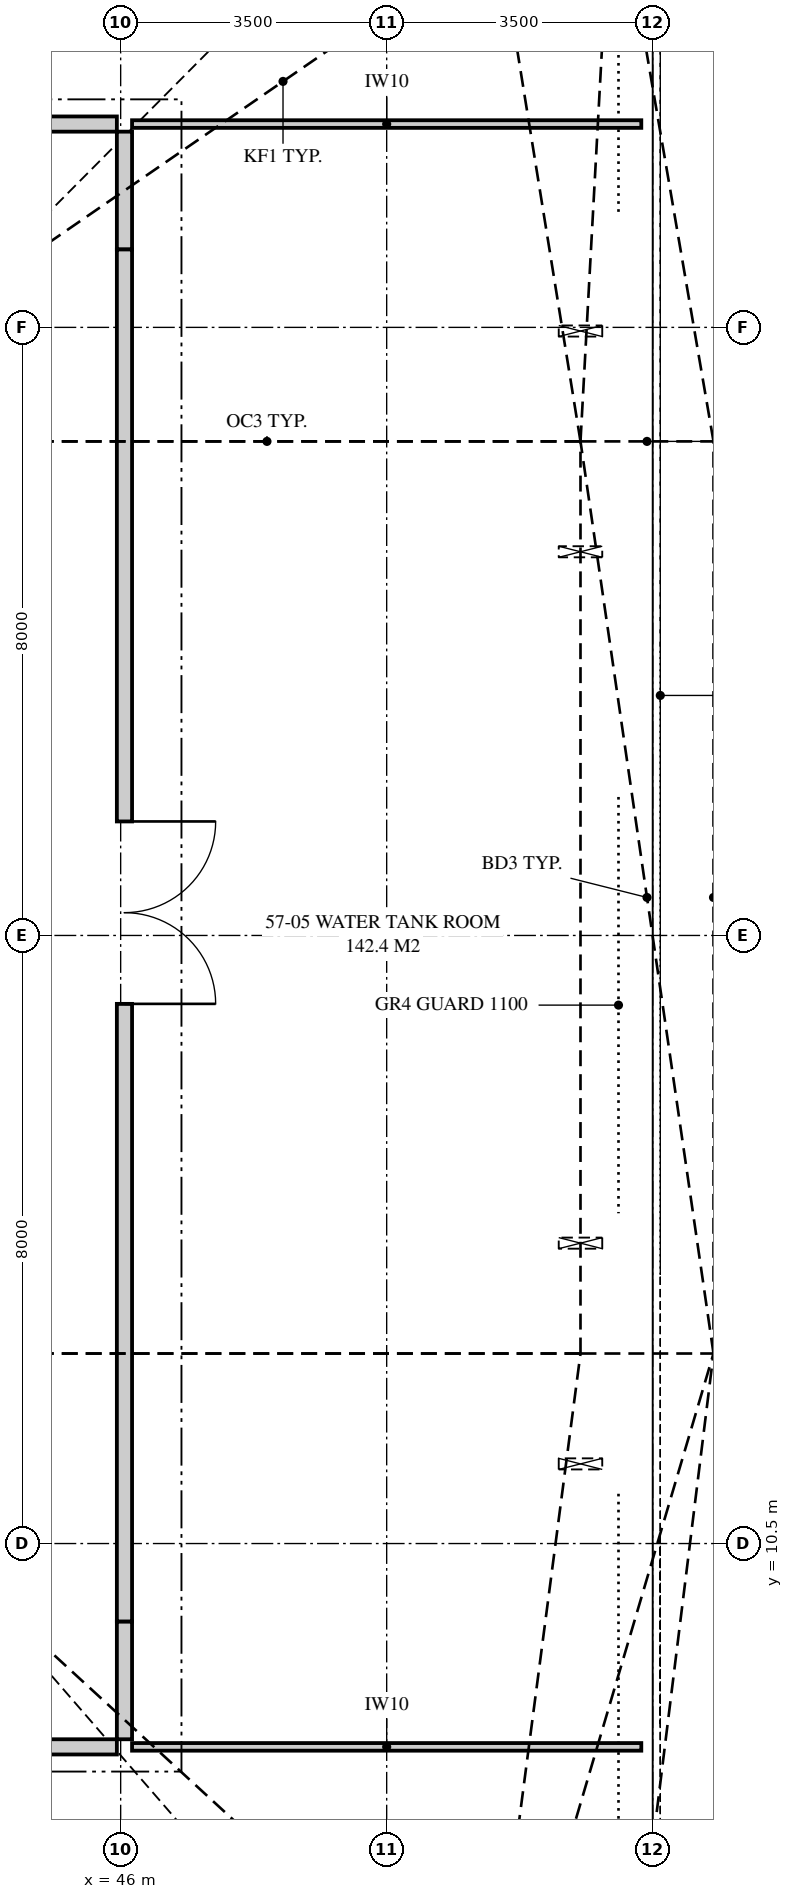
"""IFC4 building model, lengths in metres.
Left out: names, types, materials, properties, quantities, classifications, styles, units other than length and angle.
Written with IfcOpenShell. Run it as: python <this file> out.ifc"""

import sys

from ifc_helpers import new_model, si_unit, direction, frame, frame_2d, origin, place, context, subcontext, project, spatial, polyline, rectangle, outline, extrude, element, fill, save


model = new_model("IFC4")
c1 = context("Model", 3, precision=1e-05, world=origin(), true_north=direction((0.0, 1.0)))
c2 = subcontext(c1, "Body", "Model", "MODEL_VIEW")
j1 = project(units=[si_unit("LENGTHUNIT", "METRE"), si_unit("PLANEANGLEUNIT", "RADIAN")], contexts=[c1])
p1 = place(None, origin())
s1 = spatial("IfcSite", under=j1, at=p1, CompositionType="ELEMENT")
p2 = place(p1, origin())
s2 = spatial("IfcBuilding", under=s1, at=p2, CompositionType="ELEMENT")
p3 = place(p2, frame((0.0, 0.0, 207.95)))
s3 = spatial("IfcBuildingStorey", under=s2, at=p3, CompositionType="ELEMENT", Elevation=207.95)
p4 = place(p3, frame((17.85, 7.825, 0.0), z_axis=(0.0, 0.0, 1.0), x_axis=(1.0, 0.0, 0.0)))
e1 = element("IfcWall", 1, at=p4, inside=s3, PredefinedType="PARTITIONING", context=c2, shape_type="SweptSolid", body=[
    extrude(outline(polyline([(28.1, 1.2), (28.1, 4.72), (24.046, 4.72), (24.046, 4.141), (23.199, 4.141), (23.199, 4.72), (20.797, 4.72), (20.797, 4.141), (19.951, 4.141), (19.951, 4.72), (17.281, 4.72), (17.281, 4.245), (16.769, 4.245), (16.769, 4.72), (15.675, 4.72), (15.675, 4.141), (14.708, 4.141), (14.708, 4.72), (10.886, 4.72), (10.886, 4.141), (10.042, 4.141), (10.042, 4.72), (5.956, 4.72), (5.956, 4.141), (5.037, 4.141), (5.037, 4.72), (3.758, 4.72), (3.758, 4.141), (3.117, 4.141), (3.117, 4.72), (1.606, 4.72), (1.606, 4.141), (1.038, 4.141), (1.038, 4.72), (0.0, 4.72), (0.0, 1.2), (1.102, 1.2), (1.102, 0.0), (27.304, 0.0), (27.304, 1.2), (28.1, 1.2)]), holes=[polyline([(16.179, 3.43), (16.686, 3.496), (16.686, 3.004), (16.632, 2.889), (16.125, 2.824), (16.125, 3.316), (16.179, 3.43)])]), frame((0.0, 0.1, 0.0), z_axis=(0.0, -1.0, 0.0), x_axis=(1.0, 0.0, 0.0)), (0.0, 0.0, 1.0), 0.2),
])
p5 = place(p4, frame((1.325, 0.0, 0.0)))
e2 = element("IfcOpeningElement", 2, at=p5, cuts=e1, PredefinedType="OPENING", context=c2, shape_type="SweptSolid", body=[
    extrude(rectangle(XDim=1.0, YDim=2.1, at=frame_2d((0.5, 1.05))), frame((0.0, 0.11, 0.0), z_axis=(0.0, -1.0, 0.0), x_axis=(1.0, 0.0, 0.0)), (0.0, 0.0, 1.0), 0.22),
])
p6 = place(p4, frame((26.1, 0.0, 0.0)))
e3 = element("IfcOpeningElement", 3, at=p6, cuts=e1, PredefinedType="OPENING", context=c2, shape_type="SweptSolid", body=[
    extrude(rectangle(XDim=1.0, YDim=2.1, at=frame_2d((0.5, 1.05))), frame((0.0, 0.11, 0.0), z_axis=(0.0, -1.0, 0.0), x_axis=(1.0, 0.0, 0.0)), (0.0, 0.0, 1.0), 0.22),
])
p7 = place(p3, frame((46.05, 7.925, 0.0), z_axis=(0.0, 0.0, 1.0), x_axis=(0.0, 1.0, 0.0)))
e4 = element("IfcWall", 4, at=p7, inside=s3, PredefinedType="PARTITIONING", context=c2, shape_type="SweptSolid", body=[
    extrude(outline(polyline([(1.55, 0.0), (1.55, 4.72), (0.669, 4.72), (0.669, 4.141), (0.0, 4.141), (0.0, 1.2), (0.609, 1.2), (0.609, 0.0), (1.55, 0.0)])), frame((0.0, 0.1, 0.0), z_axis=(0.0, -1.0, 0.0), x_axis=(1.0, 0.0, 0.0)), (0.0, 0.0, 1.0), 0.2),
])
p8 = place(p3, frame((17.85, 29.175, 0.0), z_axis=(0.0, 0.0, 1.0), x_axis=(1.0, 0.0, 0.0)))
e5 = element("IfcWall", 5, at=p8, inside=s3, PredefinedType="PARTITIONING", context=c2, shape_type="SweptSolid", body=[
    extrude(outline(polyline([(28.1, 1.2), (28.1, 4.72), (23.48, 4.72), (23.48, 4.141), (22.49, 4.141), (22.49, 4.72), (21.506, 4.72), (21.506, 4.141), (20.516, 4.141), (20.516, 4.72), (17.281, 4.72), (17.281, 4.245), (16.769, 4.245), (16.769, 4.72), (13.232, 4.72), (13.232, 4.141), (12.437, 4.141), (12.437, 4.72), (11.948, 4.72), (11.948, 4.141), (11.126, 4.141), (11.126, 4.72), (4.143, 4.72), (4.143, 4.141), (2.733, 4.141), (2.733, 4.72), (1.35, 4.72), (1.35, 4.141), (0.74, 4.141), (0.74, 4.72), (0.0, 4.72), (0.0, 1.2), (0.892, 1.2), (0.892, 0.0), (27.554, 0.0), (27.554, 1.2), (28.1, 1.2)]), holes=[polyline([(16.106, 3.278), (16.617, 3.359), (16.617, 2.855), (16.556, 2.728), (16.045, 2.646), (16.045, 3.15), (16.106, 3.278)])]), frame((0.0, 0.1, 0.0), z_axis=(0.0, -1.0, 0.0), x_axis=(1.0, 0.0, 0.0)), (0.0, 0.0, 1.0), 0.2),
])
p9 = place(p8, frame((12.8, 0.0, 0.0)))
e6 = element("IfcOpeningElement", 6, at=p9, cuts=e5, PredefinedType="OPENING", context=c2, shape_type="SweptSolid", body=[
    extrude(rectangle(XDim=2.4, YDim=2.4, at=frame_2d((1.2, 1.2))), frame((0.0, 0.11, 0.0), z_axis=(0.0, -1.0, 0.0), x_axis=(1.0, 0.0, 0.0)), (0.0, 0.0, 1.0), 0.22),
])
p10 = place(p3, frame((46.05, 27.525, 0.0), z_axis=(0.0, 0.0, 1.0), x_axis=(0.0, 1.0, 0.0)))
e7 = element("IfcWall", 7, at=p10, inside=s3, PredefinedType="PARTITIONING", context=c2, shape_type="SweptSolid", body=[
    extrude(outline(polyline([(1.55, 1.2), (1.55, 4.72), (1.13, 4.72), (1.13, 4.141), (0.419, 4.141), (0.419, 4.72), (0.0, 4.72), (0.0, 0.0), (0.681, 0.0), (0.681, 1.2), (1.55, 1.2)])), frame((0.0, 0.1, 0.0), z_axis=(0.0, -1.0, 0.0), x_axis=(1.0, 0.0, 0.0)), (0.0, 0.0, 1.0), 0.2),
])
p11 = place(p3, frame((46.05, 9.475, 0.0), z_axis=(0.0, 0.0, 1.0), x_axis=(0.0, 1.0, 0.0)))
e8 = element("IfcWall", 8, at=p11, inside=s3, PredefinedType="PARTITIONING", context=c2, shape_type="SweptSolid", body=[
    extrude(outline(polyline([(18.05, 0.0), (18.05, 4.72), (15.737, 4.72), (15.737, 4.245), (15.313, 4.245), (15.313, 4.72), (3.737, 4.72), (3.737, 4.245), (3.313, 4.245), (3.313, 4.72), (0.0, 4.72), (0.0, 0.0), (18.05, 0.0)]), holes=[polyline([(3.303, 2.771), (3.303, 3.467), (3.747, 3.467), (3.747, 2.771), (3.303, 2.771)]), polyline([(15.303, 2.771), (15.303, 3.467), (15.747, 3.467), (15.747, 2.771), (15.303, 2.771)])]), frame((0.0, 0.1, 0.0), z_axis=(0.0, -1.0, 0.0), x_axis=(1.0, 0.0, 0.0)), (0.0, 0.0, 1.0), 0.2),
])
p12 = place(p11, frame((8.125, 0.0, 0.0)))
e9 = element("IfcOpeningElement", 9, at=p12, cuts=e8, PredefinedType="OPENING", context=c2, shape_type="SweptSolid", body=[
    extrude(rectangle(XDim=2.4, YDim=2.4, at=frame_2d((1.2, 1.2))), frame((0.0, 0.11, 0.0), z_axis=(0.0, -1.0, 0.0), x_axis=(1.0, 0.0, 0.0)), (0.0, 0.0, 1.0), 0.22),
])
p13 = place(p3, frame((46.15, 7.825, 0.0), z_axis=(0.0, 0.0, 1.0), x_axis=(1.0, 0.0, 0.0)))
e10 = element("IfcWall", 10, at=p13, inside=s3, PredefinedType="PARTITIONING", context=c2, shape_type="SweptSolid", body=[
    extrude(outline(polyline([(0.458, 0.0), (6.7, 0.0), (6.7, 1.203), (5.626, 1.203), (5.626, 2.204), (5.66, 2.257), (6.614, 2.379), (6.7, 2.379), (6.7, 3.72), (6.499, 3.72), (6.499, 4.72), (0.691, 4.72), (0.691, 4.141), (0.0, 4.141), (0.0, 1.2), (0.458, 1.2), (0.458, 0.0)])), frame((0.0, 0.05, 0.0), z_axis=(0.0, -1.0, 0.0), x_axis=(1.0, 0.0, 0.0)), (0.0, 0.0, 1.0), 0.1),
])
p14 = place(p3, frame((46.15, 29.175, 0.0), z_axis=(0.0, 0.0, 1.0), x_axis=(1.0, 0.0, 0.0)))
e11 = element("IfcWall", 11, at=p14, inside=s3, PredefinedType="PARTITIONING", context=c2, shape_type="SweptSolid", body=[
    extrude(outline(polyline([(0.812, 0.0), (6.7, 0.0), (6.7, 3.72), (6.416, 3.72), (6.416, 4.72), (1.66, 4.72), (1.66, 4.141), (0.682, 4.141), (0.682, 4.72), (0.0, 4.72), (0.0, 1.2), (0.812, 1.2), (0.812, 0.0)]), holes=[polyline([(5.665, 1.329), (5.665, 2.411), (5.671, 2.485), (6.592, 2.518), (6.592, 1.435), (6.585, 1.361), (5.665, 1.329)])]), frame((0.0, 0.05, 0.0), z_axis=(0.0, -1.0, 0.0), x_axis=(1.0, 0.0, 0.0)), (0.0, 0.0, 1.0), 0.1),
])
p15 = place(p12, frame((2.4, 0.0, 0.0), z_axis=(0.0, 0.0, 1.0), x_axis=(-1.0, 0.0, 0.0)))
e12 = element("IfcDoor", 12, at=p15, inside=s3, OperationType="DOUBLE_DOOR_SINGLE_SWING", PredefinedType="DOOR", context=c2, shape_type="SweptSolid", body=[
    extrude(rectangle(XDim=2.4, YDim=2.4, at=frame_2d((1.2, 1.2))), frame((0.0, 0.025, 0.0), z_axis=(0.0, -1.0, 0.0), x_axis=(1.0, 0.0, 0.0)), (0.0, 0.0, 1.0), 0.05),
])
fill(e9, e12)
save(model, sys.argv[1])
